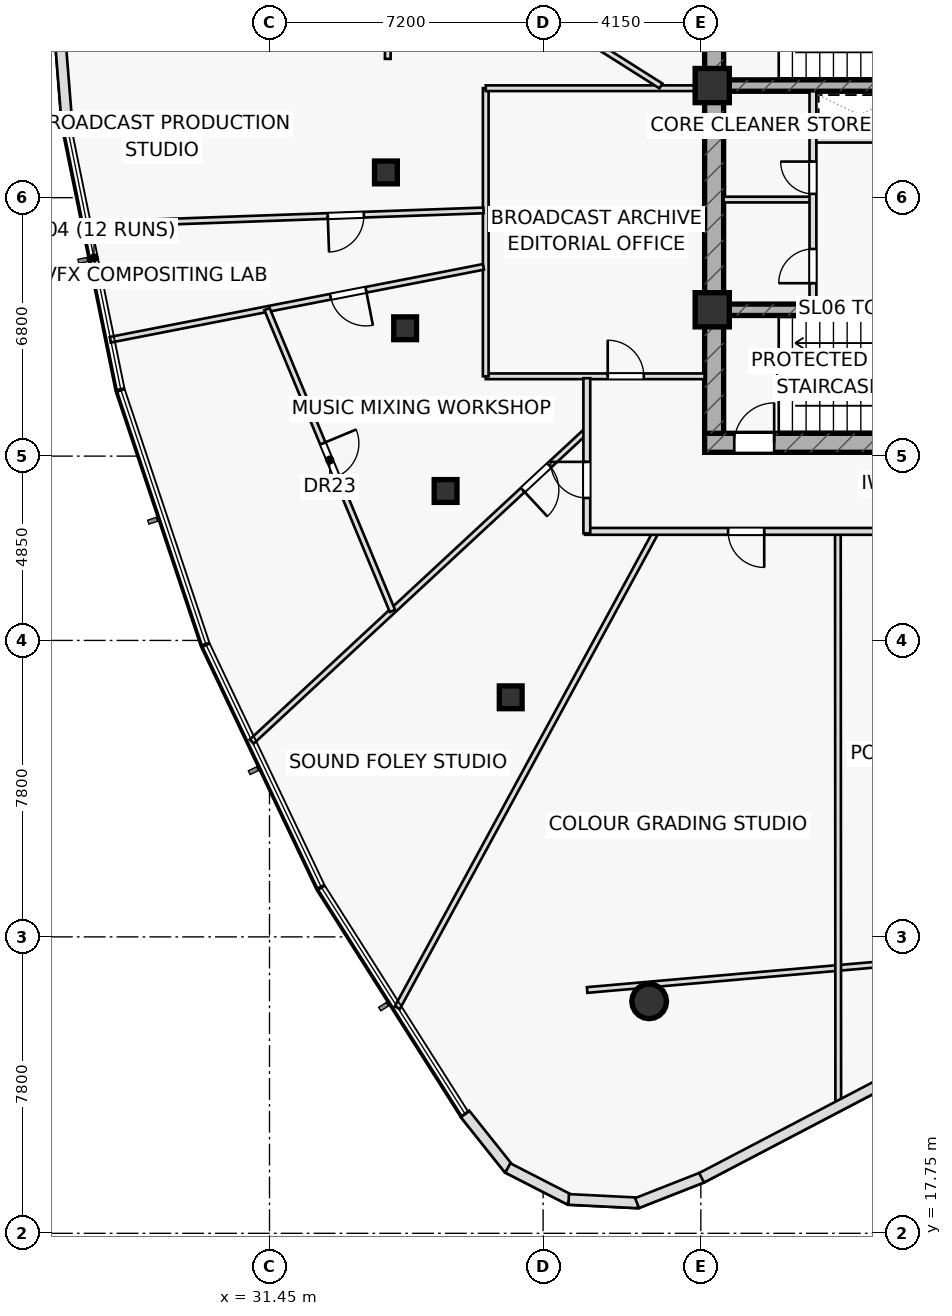
"""IFC4 building model, lengths in metres.
Left out: names, types, materials, properties, quantities, classifications, styles, units other than length and angle.
Written with IfcOpenShell. Run it as: python <this file> out.ifc"""

import sys

from ifc_helpers import new_model, si_unit, direction, frame, frame_2d, origin, origin_2d, place, context, subcontext, project, spatial, rectangle, hollow_rectangle, hollow_circle, extrude, element, fill, save


model = new_model("IFC4")
c1 = context("Model", 3, precision=1e-05, world=origin(), true_north=direction((0.0, 1.0)))
c2 = subcontext(c1, "Body", "Model", "MODEL_VIEW")
j1 = project(units=[si_unit("LENGTHUNIT", "METRE"), si_unit("PLANEANGLEUNIT", "RADIAN")], contexts=[c1])
p1 = place(None, origin())
s1 = spatial("IfcSite", under=j1, at=p1, CompositionType="ELEMENT")
p2 = place(p1, origin())
s2 = spatial("IfcBuilding", under=s1, at=p2, CompositionType="ELEMENT")
p3 = place(p2, frame((0.0, 0.0, 230.05)))
s3 = spatial("IfcBuildingStorey", under=s2, at=p3, CompositionType="ELEMENT", Elevation=230.05)
p4 = place(p3, frame((42.9, 38.55, 0.0), z_axis=(0.0, 0.0, 1.0), x_axis=(1.0, 0.0, 0.0)))
e1 = element("IfcWall", 1, at=p4, inside=s3, PredefinedType="SHEAR", context=c2, shape_type="SweptSolid", body=[
    extrude(rectangle(XDim=14.2, YDim=0.5, at=frame_2d((7.1, 0.0))), origin(), (0.0, 0.0, 1.0), 3.65),
])
p5 = place(p4, frame((0.78, 0.0, 0.0)))
e2 = element("IfcOpeningElement", 2, at=p5, cuts=e1, PredefinedType="OPENING", context=c2, shape_type="SweptSolid", body=[
    extrude(rectangle(XDim=1.05, YDim=2.2, at=frame_2d((0.525, 1.1))), frame((0.0, 0.26, 0.0), z_axis=(0.0, -1.0, 0.0), x_axis=(1.0, 0.0, 0.0)), (0.0, 0.0, 1.0), 0.52),
])
p6 = place(p3, frame((43.15, 38.8, 0.0), z_axis=(0.0, 0.0, 1.0), x_axis=(0.0, 1.0, 0.0)))
e3 = element("IfcWall", 3, at=p6, inside=s3, PredefinedType="SHEAR", context=c2, shape_type="SweptSolid", body=[
    extrude(rectangle(XDim=12.4, YDim=0.5, at=frame_2d((6.2, 0.0))), origin(), (0.0, 0.0, 1.0), 3.65),
])
p7 = place(p3, frame((43.4, 47.95, 0.0), z_axis=(0.0, 0.0, 1.0), x_axis=(1.0, 0.0, 0.0)))
e4 = element("IfcWall", 4, at=p7, inside=s3, PredefinedType="SHEAR", context=c2, shape_type="SweptSolid", body=[
    extrude(rectangle(XDim=13.2, YDim=0.3, at=frame_2d((6.6, 0.0))), origin(), (0.0, 0.0, 1.0), 3.65),
])
p8 = place(p7, frame((8.345, 0.0, 0.0)))
e5 = element("IfcOpeningElement", 5, at=p8, cuts=e4, PredefinedType="OPENING", context=c2, shape_type="SweptSolid", body=[
    extrude(rectangle(XDim=1.15, YDim=2.2, at=frame_2d((0.575, 1.1))), frame((0.0, 0.16, 0.0), z_axis=(0.0, -1.0, 0.0), x_axis=(1.0, 0.0, 0.0)), (0.0, 0.0, 1.0), 0.32),
])
p9 = place(p7, frame((10.065, 0.0, 0.0)))
e6 = element("IfcOpeningElement", 6, at=p9, cuts=e4, PredefinedType="OPENING", context=c2, shape_type="SweptSolid", body=[
    extrude(rectangle(XDim=1.15, YDim=2.2, at=frame_2d((0.575, 1.1))), frame((0.0, 0.16, 0.0), z_axis=(0.0, -1.0, 0.0), x_axis=(1.0, 0.0, 0.0)), (0.0, 0.0, 1.0), 0.32),
])
p10 = place(p7, frame((11.645, 0.0, 0.0)))
e7 = element("IfcOpeningElement", 7, at=p10, cuts=e4, PredefinedType="OPENING", context=c2, shape_type="SweptSolid", body=[
    extrude(rectangle(XDim=1.15, YDim=2.2, at=frame_2d((0.575, 1.1))), frame((0.0, 0.16, 0.0), z_axis=(0.0, -1.0, 0.0), x_axis=(1.0, 0.0, 0.0)), (0.0, 0.0, 1.0), 0.32),
])
p11 = place(p3, frame((43.4, 42.05, 0.0), z_axis=(0.0, 0.0, 1.0), x_axis=(1.0, 0.0, 0.0)))
e8 = element("IfcWall", 8, at=p11, inside=s3, PredefinedType="SHEAR", context=c2, shape_type="SweptSolid", body=[
    extrude(rectangle(XDim=13.2, YDim=0.3, at=frame_2d((6.6, 0.0))), origin(), (0.0, 0.0, 1.0), 3.65),
])
p12 = place(p11, frame((9.1, 0.0, 0.0)))
e9 = element("IfcOpeningElement", 9, at=p12, cuts=e8, PredefinedType="OPENING", context=c2, shape_type="SweptSolid", body=[
    extrude(rectangle(XDim=1.5, YDim=2.2, at=frame_2d((0.75, 1.1))), frame((0.0, 0.16, 0.0), z_axis=(0.0, -1.0, 0.0), x_axis=(1.0, 0.0, 0.0)), (0.0, 0.0, 1.0), 0.32),
])
for number, where, z_axis, x_axis in (
    (10, (43.1, 47.95, 0.0), (0.0, 0.0, 1.0), (1.0, 0.0, 0.0)),
    (11, (43.1, 42.05, 0.0), (0.0, 0.0, 1.0), (1.0, 0.0, 0.0)),
):
    element("IfcColumn", number, at=place(p3, frame(where, z_axis=z_axis, x_axis=x_axis)), inside=s3, PredefinedType="COLUMN", context=c2, shape_type="SweptSolid", body=[
        extrude(rectangle(XDim=0.9, YDim=0.9, at=origin_2d()), origin(), (0.0, 0.0, 1.0), 3.65),
    ])
for number, where, z_axis, x_axis in (
    (12, (34.514, 45.665, 0.0), (0.0, 0.0, 1.0), (1.0, 0.0, 0.0)),
    (13, (35.019, 41.564, 0.0), (0.0, 0.0, 1.0), (1.0, 0.0, 0.0)),
    (14, (36.083, 37.282, 0.0), (0.0, 0.0, 1.0), (1.0, 0.0, 0.0)),
    (15, (37.797, 31.853, 0.0), (0.0, 0.0, 1.0), (1.0, 0.0, 0.0)),
):
    element("IfcColumn", number, at=place(p3, frame(where, z_axis=z_axis, x_axis=x_axis)), inside=s3, PredefinedType="COLUMN", context=c2, shape_type="SweptSolid", body=[
        extrude(hollow_rectangle(XDim=0.6, YDim=0.6, WallThickness=0.036, at=origin_2d()), origin(), (0.0, 0.0, 1.0), 3.65),
    ])
p13 = place(p3, frame((41.44, 23.854, 0.0), z_axis=(0.0, 0.0, 1.0), x_axis=(1.0, 0.0, 0.0)))
e16 = element("IfcColumn", 16, at=p13, inside=s3, PredefinedType="COLUMN", context=c2, shape_type="SweptSolid", body=[
    extrude(hollow_circle(Radius=0.457, WallThickness=0.04, at=origin_2d()), origin(), (0.0, 0.0, 1.0), 3.65),
])
p14 = place(p3, frame((45.75, 46.55, 0.0), z_axis=(0.0, 0.0, 1.0), x_axis=(1.0, 0.0, 0.0)))
e17 = element("IfcWall", 17, at=p14, inside=s3, PredefinedType="PARTITIONING", context=c2, shape_type="SweptSolid", body=[
    extrude(rectangle(XDim=2.4, YDim=0.2, at=frame_2d((1.2, 0.0))), origin(), (0.0, 0.0, 1.0), 3.65),
])
p15 = place(p3, frame((43.4, 44.95, 0.0), z_axis=(0.0, 0.0, 1.0), x_axis=(1.0, 0.0, 0.0)))
e18 = element("IfcWall", 18, at=p15, inside=s3, PredefinedType="PARTITIONING", context=c2, shape_type="SweptSolid", body=[
    extrude(rectangle(XDim=2.35, YDim=0.15, at=frame_2d((1.175, 0.0))), origin(), (0.0, 0.0, 1.0), 3.65),
])
p16 = place(p3, frame((45.75, 42.2, 0.0), z_axis=(0.0, 0.0, 1.0), x_axis=(0.0, 1.0, 0.0)))
e19 = element("IfcWall", 19, at=p16, inside=s3, PredefinedType="PARTITIONING", context=c2, shape_type="SweptSolid", body=[
    extrude(rectangle(XDim=5.6, YDim=0.18, at=frame_2d((2.8, 0.0))), origin(), (0.0, 0.0, 1.0), 3.65),
])
p17 = place(p16, frame((0.55, 0.0, 0.0)))
e20 = element("IfcOpeningElement", 20, at=p17, cuts=e19, PredefinedType="OPENING", context=c2, shape_type="SweptSolid", body=[
    extrude(rectangle(XDim=0.9, YDim=2.05, at=frame_2d((0.45, 1.025))), frame((0.0, 0.1, 0.0), z_axis=(0.0, -1.0, 0.0), x_axis=(1.0, 0.0, 0.0)), (0.0, 0.0, 1.0), 0.2),
])
p18 = place(p16, frame((2.9, 0.0, 0.0)))
e21 = element("IfcOpeningElement", 21, at=p18, cuts=e19, PredefinedType="OPENING", context=c2, shape_type="SweptSolid", body=[
    extrude(rectangle(XDim=0.85, YDim=2.05, at=frame_2d((0.425, 1.025))), frame((0.0, 0.1, 0.0), z_axis=(0.0, -1.0, 0.0), x_axis=(1.0, 0.0, 0.0)), (0.0, 0.0, 1.0), 0.2),
])
p19 = place(p3, frame((34.652, 58.056, 0.0), z_axis=(0.0, 0.0, 1.0), x_axis=(-0.009553538759, -0.999954363907, 0.0)))
e22 = element("IfcWall", 22, at=p19, inside=s3, PredefinedType="PARTITIONING", context=c2, shape_type="SweptSolid", body=[
    extrude(rectangle(XDim=9.404, YDim=0.15, at=frame_2d((4.702, 0.0))), origin(), (0.0, 0.0, 1.0), 3.135),
])
p20 = place(p3, frame((39.808, 24.152, 0.0), z_axis=(0.0, 0.0, 1.0), x_axis=(0.996153584085, 0.087624408208, 0.0)))
e23 = element("IfcWall", 23, at=p20, inside=s3, PredefinedType="PARTITIONING", context=c2, shape_type="SweptSolid", body=[
    extrude(rectangle(XDim=10.632, YDim=0.15, at=frame_2d((5.316, 0.0))), origin(), (0.0, 0.0, 1.0), 3.135),
])
p21 = place(p3, frame((37.14, 40.3, 0.0), z_axis=(0.0, 0.0, 1.0), x_axis=(1.0, 0.0, 0.0)))
e24 = element("IfcWall", 24, at=p21, inside=s3, PredefinedType="PARTITIONING", context=c2, shape_type="SweptSolid", body=[
    extrude(rectangle(XDim=5.76, YDim=0.15, at=frame_2d((2.88, 0.0))), origin(), (0.0, 0.0, 1.0), 3.025),
])
p22 = place(p21, frame((3.21, 0.0, 0.0)))
e25 = element("IfcOpeningElement", 25, at=p22, cuts=e24, PredefinedType="OPENING", context=c2, shape_type="SweptSolid", body=[
    extrude(rectangle(XDim=0.95, YDim=2.05, at=frame_2d((0.475, 1.025))), frame((0.0, 0.085, 0.0), z_axis=(0.0, -1.0, 0.0), x_axis=(1.0, 0.0, 0.0)), (0.0, 0.0, 1.0), 0.17),
])
p23 = place(p3, frame((37.14, 40.3, 0.0), z_axis=(0.0, 0.0, 1.0), x_axis=(0.0, 1.0, 0.0)))
e26 = element("IfcWall", 26, at=p23, inside=s3, PredefinedType="PARTITIONING", context=c2, shape_type="SweptSolid", body=[
    extrude(rectangle(XDim=7.58, YDim=0.15, at=frame_2d((3.79, 0.0))), origin(), (0.0, 0.0, 1.0), 3.65),
])
p24 = place(p3, frame((37.14, 47.88, 0.0), z_axis=(0.0, 0.0, 1.0), x_axis=(1.0, 0.0, 0.0)))
e27 = element("IfcWall", 27, at=p24, inside=s3, PredefinedType="PARTITIONING", context=c2, shape_type="SweptSolid", body=[
    extrude(rectangle(XDim=5.76, YDim=0.15, at=frame_2d((2.88, 0.0))), origin(), (0.0, 0.0, 1.0), 3.025),
])
p25 = place(p3, frame((41.75, 47.94, 0.0), z_axis=(0.0, 0.0, 1.0), x_axis=(-0.845214636511, 0.534426999905, 0.0)))
e28 = element("IfcWall", 28, at=p25, inside=s3, PredefinedType="PARTITIONING", context=c2, shape_type="SweptSolid", body=[
    extrude(rectangle(XDim=18.96, YDim=0.15, at=frame_2d((9.48, 0.0))), origin(), (0.0, 0.0, 1.0), 3.025),
])
p26 = place(p3, frame((37.08, 44.665, 0.0), z_axis=(0.0, 0.0, 1.0), x_axis=(-0.99935523855, -0.035904138807, 0.0)))
e29 = element("IfcWall", 29, at=p26, inside=s3, PredefinedType="PARTITIONING", context=c2, shape_type="SweptSolid", body=[
    extrude(rectangle(XDim=10.445, YDim=0.15, at=frame_2d((5.222, 0.0))), origin(), (0.0, 0.0, 1.0), 3.135),
])
p27 = place(p26, frame((3.15, 0.0, 0.0)))
e30 = element("IfcOpeningElement", 30, at=p27, cuts=e29, PredefinedType="OPENING", context=c2, shape_type="SweptSolid", body=[
    extrude(rectangle(XDim=0.95, YDim=2.05, at=frame_2d((0.475, 1.025))), frame((0.0, 0.085, 0.0), z_axis=(0.0, -1.0, 0.0), x_axis=(1.0, 0.0, 0.0)), (0.0, 0.0, 1.0), 0.17),
])
p28 = place(p3, frame((37.08, 43.179, 0.0), z_axis=(0.0, 0.0, 1.0), x_axis=(-0.981455674123, -0.191689226957, 0.0)))
e31 = element("IfcWall", 31, at=p28, inside=s3, PredefinedType="PARTITIONING", context=c2, shape_type="SweptSolid", body=[
    extrude(rectangle(XDim=10.006, YDim=0.15, at=frame_2d((5.003, 0.0))), origin(), (0.0, 0.0, 1.0), 3.135),
])
p29 = place(p28, frame((3.15, 0.0, 0.0)))
e32 = element("IfcOpeningElement", 32, at=p29, cuts=e31, PredefinedType="OPENING", context=c2, shape_type="SweptSolid", body=[
    extrude(rectangle(XDim=0.95, YDim=2.05, at=frame_2d((0.475, 1.025))), frame((0.0, 0.085, 0.0), z_axis=(0.0, -1.0, 0.0), x_axis=(1.0, 0.0, 0.0)), (0.0, 0.0, 1.0), 0.17),
])
p30 = place(p3, frame((39.8, 38.874, 0.0), z_axis=(0.0, 0.0, 1.0), x_axis=(-0.732923558044, -0.680311000987, 0.0)))
e33 = element("IfcWall", 33, at=p30, inside=s3, PredefinedType="PARTITIONING", context=c2, shape_type="SweptSolid", body=[
    extrude(rectangle(XDim=12.032, YDim=0.15, at=frame_2d((6.016, 0.0))), origin(), (0.0, 0.0, 1.0), 3.025),
])
p31 = place(p30, frame((1.35, 0.0, 0.0)))
e34 = element("IfcOpeningElement", 34, at=p31, cuts=e33, PredefinedType="OPENING", context=c2, shape_type="SweptSolid", body=[
    extrude(rectangle(XDim=0.95, YDim=2.05, at=frame_2d((0.475, 1.025))), frame((0.0, 0.085, 0.0), z_axis=(0.0, -1.0, 0.0), x_axis=(1.0, 0.0, 0.0)), (0.0, 0.0, 1.0), 0.17),
])
p32 = place(p3, frame((41.627, 36.22, 0.0), z_axis=(0.0, 0.0, 1.0), x_axis=(-0.47763709518, -0.878557229387, 0.0)))
e35 = element("IfcWall", 35, at=p32, inside=s3, PredefinedType="PARTITIONING", context=c2, shape_type="SweptSolid", body=[
    extrude(rectangle(XDim=14.267, YDim=0.15, at=frame_2d((7.133, 0.0))), origin(), (0.0, 0.0, 1.0), 3.135),
])
p33 = place(p3, frame((46.406, 36.22, 0.0), z_axis=(0.0, 0.0, 1.0), x_axis=(0.000693481109, -0.999999759542, 0.0)))
e36 = element("IfcWall", 36, at=p33, inside=s3, PredefinedType="PARTITIONING", context=c2, shape_type="SweptSolid", body=[
    extrude(rectangle(XDim=15.138, YDim=0.15, at=frame_2d((7.569, 0.0))), origin(), (0.0, 0.0, 1.0), 3.025),
])
p34 = place(p3, frame((31.384, 42.067, 0.0), z_axis=(0.0, 0.0, 1.0), x_axis=(0.383853274967, -0.923394099666, 0.0)))
e37 = element("IfcWall", 37, at=p34, inside=s3, PredefinedType="PARTITIONING", context=c2, shape_type="SweptSolid", body=[
    extrude(rectangle(XDim=8.6, YDim=0.15, at=frame_2d((4.3, 0.0))), origin(), (0.0, 0.0, 1.0), 3.65),
])
p35 = place(p34, frame((3.825, 0.0, 0.0)))
e38 = element("IfcOpeningElement", 38, at=p35, cuts=e37, PredefinedType="OPENING", context=c2, shape_type="SweptSolid", body=[
    extrude(rectangle(XDim=0.95, YDim=2.05, at=frame_2d((0.475, 1.025))), frame((0.0, 0.085, 0.0), z_axis=(0.0, -1.0, 0.0), x_axis=(1.0, 0.0, 0.0)), (0.0, 0.0, 1.0), 0.17),
])
p36 = place(p3, frame((59.23, 36.22, 0.0), z_axis=(0.0, 0.0, 1.0), x_axis=(-1.0, 0.0, 0.0)))
e39 = element("IfcWall", 39, at=p36, inside=s3, PredefinedType="PARTITIONING", context=c2, shape_type="SweptSolid", body=[
    extrude(rectangle(XDim=19.48, YDim=0.18, at=frame_2d((9.74, 0.0))), origin(), (0.0, 0.0, 1.0), 3.025),
])
p37 = place(p36, frame((3.666, 0.0, 0.0)))
e40 = element("IfcOpeningElement", 40, at=p37, cuts=e39, PredefinedType="OPENING", context=c2, shape_type="SweptSolid", body=[
    extrude(rectangle(XDim=0.95, YDim=2.05, at=frame_2d((0.475, 1.025))), frame((0.0, 0.1, 0.0), z_axis=(0.0, -1.0, 0.0), x_axis=(1.0, 0.0, 0.0)), (0.0, 0.0, 1.0), 0.2),
])
p38 = place(p36, frame((9.579, 0.0, 0.0)))
e41 = element("IfcOpeningElement", 41, at=p38, cuts=e39, PredefinedType="OPENING", context=c2, shape_type="SweptSolid", body=[
    extrude(rectangle(XDim=0.95, YDim=2.05, at=frame_2d((0.475, 1.025))), frame((0.0, 0.1, 0.0), z_axis=(0.0, -1.0, 0.0), x_axis=(1.0, 0.0, 0.0)), (0.0, 0.0, 1.0), 0.2),
])
p39 = place(p36, frame((14.762, 0.0, 0.0)))
e42 = element("IfcOpeningElement", 42, at=p39, cuts=e39, PredefinedType="OPENING", context=c2, shape_type="SweptSolid", body=[
    extrude(rectangle(XDim=0.95, YDim=2.05, at=frame_2d((0.475, 1.025))), frame((0.0, 0.1, 0.0), z_axis=(0.0, -1.0, 0.0), x_axis=(1.0, 0.0, 0.0)), (0.0, 0.0, 1.0), 0.2),
])
p40 = place(p3, frame((39.8, 36.17, 0.0), z_axis=(0.0, 0.0, 1.0), x_axis=(0.0, 1.0, 0.0)))
e43 = element("IfcWall", 43, at=p40, inside=s3, PredefinedType="PARTITIONING", context=c2, shape_type="SweptSolid", body=[
    extrude(rectangle(XDim=4.08, YDim=0.18, at=frame_2d((2.04, 0.0))), origin(), (0.0, 0.0, 1.0), 3.325),
])
p41 = place(p40, frame((0.929, 0.0, 0.0)))
e44 = element("IfcOpeningElement", 44, at=p41, cuts=e43, PredefinedType="OPENING", context=c2, shape_type="SweptSolid", body=[
    extrude(rectangle(XDim=0.95, YDim=2.05, at=frame_2d((0.475, 1.025))), frame((0.0, 0.1, 0.0), z_axis=(0.0, -1.0, 0.0), x_axis=(1.0, 0.0, 0.0)), (0.0, 0.0, 1.0), 0.2),
])
p42 = place(p3, frame((25.561, 53.932, 0.0), z_axis=(0.0, 0.0, 1.0), x_axis=(0.079752068493, -0.996814730816, 0.0)))
e45 = element("IfcWall", 45, at=p42, inside=s3, PredefinedType="STANDARD", context=c2, shape_type="SweptSolid", body=[
    extrude(rectangle(XDim=7.087, YDim=0.28, at=frame_2d((3.543, 0.0))), origin(), (0.0, 0.0, 1.0), 3.65),
])
p43 = place(p3, frame((36.595, 20.892, 0.0), z_axis=(0.0, 0.0, 1.0), x_axis=(0.623207503323, -0.782056524685, 0.0)))
e46 = element("IfcWall", 46, at=p43, inside=s3, PredefinedType="STANDARD", context=c2, shape_type="SweptSolid", body=[
    extrude(rectangle(XDim=1.843, YDim=0.28, at=frame_2d((0.921, 0.0))), origin(), (0.0, 0.0, 1.0), 3.65),
])
for number, where, z_axis, x_axis in (
    (47, (37.721, 19.469, 0.0), (0.0, 0.0, 1.0), (0.89, -0.456, 0.0)),
    (48, (39.322, 18.642, 0.0), (0.0, 0.0, 1.0), (0.999, -0.05, 0.0)),
):
    element("IfcWall", number, at=place(p3, frame(where, z_axis=z_axis, x_axis=x_axis)), inside=s3, PredefinedType="STANDARD", context=c2, shape_type="SweptSolid", body=[
        extrude(rectangle(XDim=1.831, YDim=0.28, at=frame_2d((0.916, 0.0))), origin(), (0.0, 0.0, 1.0), 3.65),
    ])
p44 = place(p3, frame((41.122, 18.546, 0.0), z_axis=(0.0, 0.0, 1.0), x_axis=(0.930703456465, 0.365774624767, 0.0)))
e49 = element("IfcWall", 49, at=p44, inside=s3, PredefinedType="STANDARD", context=c2, shape_type="SweptSolid", body=[
    extrude(rectangle(XDim=1.854, YDim=0.28, at=frame_2d((0.927, 0.0))), origin(), (0.0, 0.0, 1.0), 3.65),
])
p45 = place(p3, frame((42.82, 19.211, 0.0), z_axis=(0.0, 0.0, 1.0), x_axis=(0.886006492009, 0.463672833059, 0.0)))
e50 = element("IfcWall", 50, at=p45, inside=s3, PredefinedType="STANDARD", context=c2, shape_type="SweptSolid", body=[
    extrude(rectangle(XDim=7.099, YDim=0.28, at=frame_2d((3.549, 0.0))), origin(), (0.0, 0.0, 1.0), 3.65),
])
p46 = place(p5, origin())
e51 = element("IfcDoor", 51, at=p46, inside=s3, OperationType="SINGLE_SWING_RIGHT", PredefinedType="DOOR", context=c2, shape_type="SweptSolid", body=[
    extrude(rectangle(XDim=1.05, YDim=2.2, at=frame_2d((0.525, 1.1))), frame((0.0, 0.025, 0.0), z_axis=(0.0, -1.0, 0.0), x_axis=(1.0, 0.0, 0.0)), (0.0, 0.0, 1.0), 0.05),
])
fill(e2, e51)
p47 = place(p17, origin())
e52 = element("IfcDoor", 52, at=p47, inside=s3, OperationType="SINGLE_SWING_LEFT", PredefinedType="DOOR", context=c2, shape_type="SweptSolid", body=[
    extrude(rectangle(XDim=0.9, YDim=2.05, at=frame_2d((0.45, 1.025))), frame((0.0, 0.025, 0.0), z_axis=(0.0, -1.0, 0.0), x_axis=(1.0, 0.0, 0.0)), (0.0, 0.0, 1.0), 0.05),
])
fill(e20, e52)
p48 = place(p18, origin())
e53 = element("IfcDoor", 53, at=p48, inside=s3, OperationType="SINGLE_SWING_RIGHT", PredefinedType="DOOR", context=c2, shape_type="SweptSolid", body=[
    extrude(rectangle(XDim=0.85, YDim=2.05, at=frame_2d((0.425, 1.025))), frame((0.0, 0.025, 0.0), z_axis=(0.0, -1.0, 0.0), x_axis=(1.0, 0.0, 0.0)), (0.0, 0.0, 1.0), 0.05),
])
fill(e21, e53)
p49 = place(p22, origin())
e54 = element("IfcDoor", 54, at=p49, inside=s3, OperationType="SINGLE_SWING_LEFT", PredefinedType="DOOR", context=c2, shape_type="SweptSolid", body=[
    extrude(rectangle(XDim=0.95, YDim=2.05, at=frame_2d((0.475, 1.025))), frame((0.0, 0.025, 0.0), z_axis=(0.0, -1.0, 0.0), x_axis=(1.0, 0.0, 0.0)), (0.0, 0.0, 1.0), 0.05),
])
fill(e25, e54)
p50 = place(p27, origin())
e55 = element("IfcDoor", 55, at=p50, inside=s3, OperationType="SINGLE_SWING_RIGHT", PredefinedType="DOOR", context=c2, shape_type="SweptSolid", body=[
    extrude(rectangle(XDim=0.95, YDim=2.05, at=frame_2d((0.475, 1.025))), frame((0.0, 0.025, 0.0), z_axis=(0.0, -1.0, 0.0), x_axis=(1.0, 0.0, 0.0)), (0.0, 0.0, 1.0), 0.05),
])
fill(e30, e55)
p51 = place(p29, origin())
e56 = element("IfcDoor", 56, at=p51, inside=s3, OperationType="SINGLE_SWING_LEFT", PredefinedType="DOOR", context=c2, shape_type="SweptSolid", body=[
    extrude(rectangle(XDim=0.95, YDim=2.05, at=frame_2d((0.475, 1.025))), frame((0.0, 0.025, 0.0), z_axis=(0.0, -1.0, 0.0), x_axis=(1.0, 0.0, 0.0)), (0.0, 0.0, 1.0), 0.05),
])
fill(e32, e56)
p52 = place(p31, origin())
e57 = element("IfcDoor", 57, at=p52, inside=s3, OperationType="SINGLE_SWING_RIGHT", PredefinedType="DOOR", context=c2, shape_type="SweptSolid", body=[
    extrude(rectangle(XDim=0.95, YDim=2.05, at=frame_2d((0.475, 1.025))), frame((0.0, 0.025, 0.0), z_axis=(0.0, -1.0, 0.0), x_axis=(1.0, 0.0, 0.0)), (0.0, 0.0, 1.0), 0.05),
])
fill(e34, e57)
p53 = place(p35, origin())
e58 = element("IfcDoor", 58, at=p53, inside=s3, OperationType="SINGLE_SWING_LEFT", PredefinedType="DOOR", context=c2, shape_type="SweptSolid", body=[
    extrude(rectangle(XDim=0.95, YDim=2.05, at=frame_2d((0.475, 1.025))), frame((0.0, 0.025, 0.0), z_axis=(0.0, -1.0, 0.0), x_axis=(1.0, 0.0, 0.0)), (0.0, 0.0, 1.0), 0.05),
])
fill(e38, e58)
p54 = place(p39, origin())
e59 = element("IfcDoor", 59, at=p54, inside=s3, OperationType="SINGLE_SWING_LEFT", PredefinedType="DOOR", context=c2, shape_type="SweptSolid", body=[
    extrude(rectangle(XDim=0.95, YDim=2.05, at=frame_2d((0.475, 1.025))), frame((0.0, 0.025, 0.0), z_axis=(0.0, -1.0, 0.0), x_axis=(1.0, 0.0, 0.0)), (0.0, 0.0, 1.0), 0.05),
])
fill(e42, e59)
p55 = place(p41, origin())
e60 = element("IfcDoor", 60, at=p55, inside=s3, OperationType="SINGLE_SWING_RIGHT", PredefinedType="DOOR", context=c2, shape_type="SweptSolid", body=[
    extrude(rectangle(XDim=0.95, YDim=2.05, at=frame_2d((0.475, 1.025))), frame((0.0, 0.025, 0.0), z_axis=(0.0, -1.0, 0.0), x_axis=(1.0, 0.0, 0.0)), (0.0, 0.0, 1.0), 0.05),
])
fill(e44, e60)
save(model, sys.argv[1])
